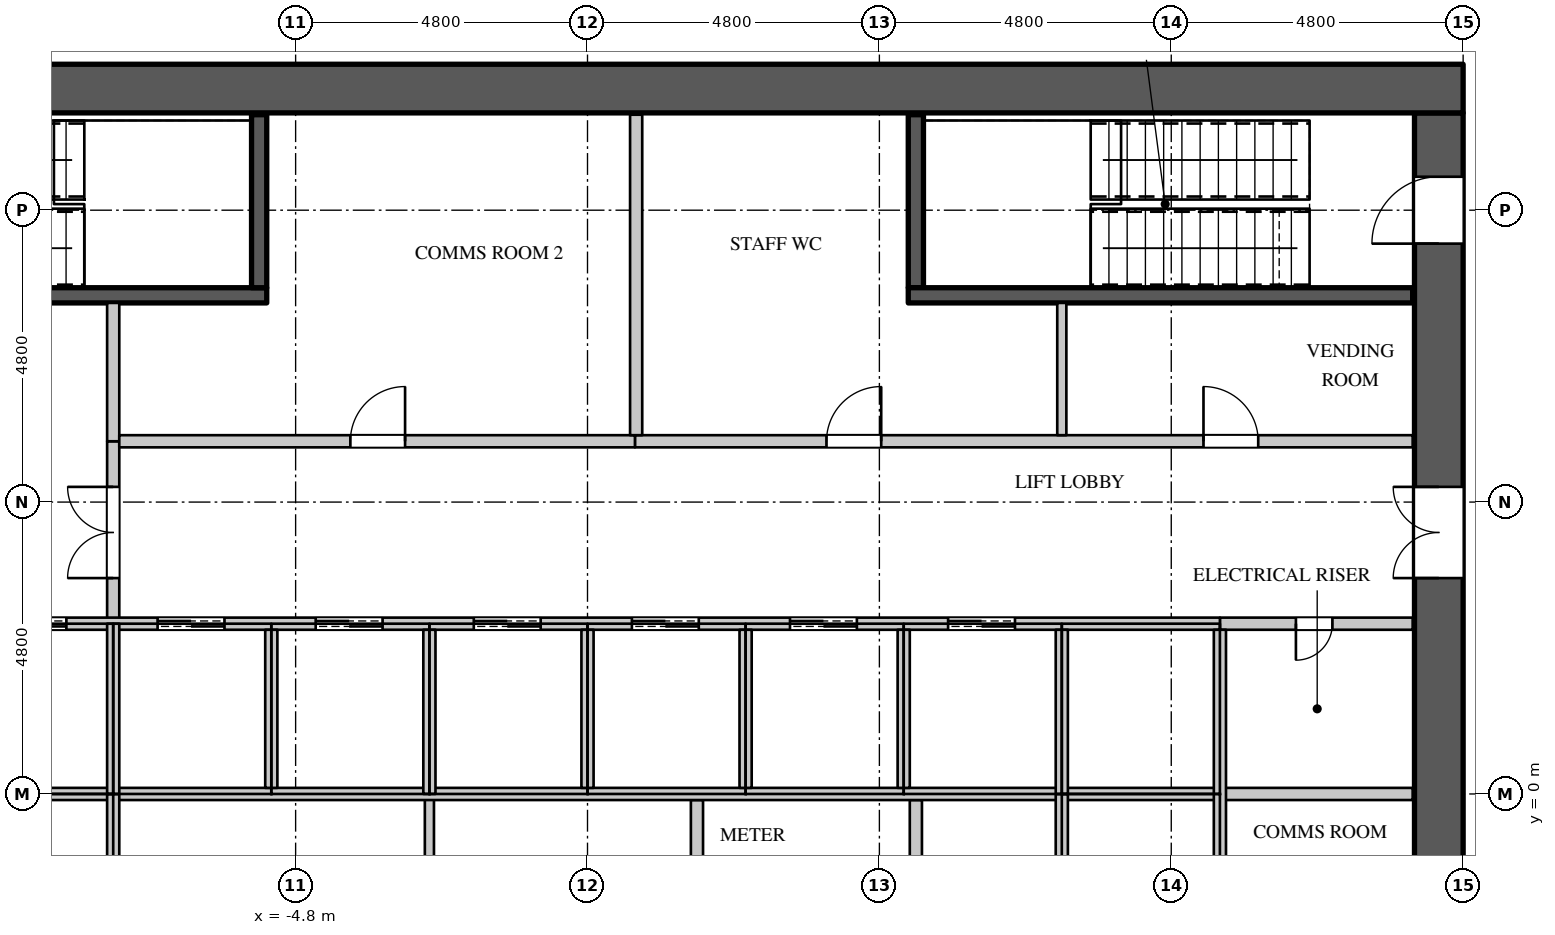
"""IFC4 building model, lengths in metres.
Left out: names, types, materials, properties, quantities, classifications, styles, units other than length and angle.
Written with IfcOpenShell. Run it as: python <this file> out.ifc"""

import sys

from ifc_helpers import new_model, si_unit, direction, frame, frame_2d, origin, place, context, subcontext, project, spatial, rectangle, extrude, element, fill, save


model = new_model("IFC4")
c1 = context("Model", 3, precision=1e-05, world=origin(), true_north=direction((0.0, 1.0)))
c2 = subcontext(c1, "Body", "Model", "MODEL_VIEW")
j1 = project(units=[si_unit("LENGTHUNIT", "METRE"), si_unit("PLANEANGLEUNIT", "RADIAN")], contexts=[c1])
p1 = place(None, origin())
s1 = spatial("IfcSite", under=j1, at=p1, CompositionType="ELEMENT")
p2 = place(p1, origin())
s2 = spatial("IfcBuilding", under=s1, at=p2, CompositionType="ELEMENT")
p3 = place(p2, frame((0.0, 0.0, 144.3)))
s3 = spatial("IfcBuildingStorey", under=s2, at=p3, CompositionType="ELEMENT", Elevation=144.3)
p4 = place(p3, frame((-14.4, 11.6, 0.0), z_axis=(0.0, 0.0, 1.0), x_axis=(1.0, 0.0, 0.0)))
e1 = element("IfcWall", 1, at=p4, inside=s3, PredefinedType="SHEAR", context=c2, shape_type="SweptSolid", body=[
    extrude(rectangle(XDim=28.8, YDim=0.8, at=frame_2d((14.4, 0.0))), origin(), (0.0, 0.0, 1.0), 4.2),
])
p5 = place(p3, frame((14.0, -11.2, 0.0), z_axis=(0.0, 0.0, 1.0), x_axis=(0.0, 1.0, 0.0)))
e2 = element("IfcWall", 2, at=p5, inside=s3, PredefinedType="SHEAR", context=c2, shape_type="SweptSolid", body=[
    extrude(rectangle(XDim=22.4, YDim=0.8, at=frame_2d((11.2, 0.0))), origin(), (0.0, 0.0, 1.0), 4.2),
])
p6 = place(p5, frame((20.25, 0.0, 0.0)))
e3 = element("IfcOpeningElement", 3, at=p6, cuts=e2, PredefinedType="OPENING", context=c2, shape_type="SweptSolid", body=[
    extrude(rectangle(XDim=1.1, YDim=2.2, at=frame_2d((0.55, 1.1))), frame((0.0, 0.41, 0.0), z_axis=(0.0, -1.0, 0.0), x_axis=(1.0, 0.0, 0.0)), (0.0, 0.0, 1.0), 0.82),
])
p7 = place(p5, frame((1.05, 0.0, 0.0)))
e4 = element("IfcOpeningElement", 4, at=p7, cuts=e2, PredefinedType="OPENING", context=c2, shape_type="SweptSolid", body=[
    extrude(rectangle(XDim=1.1, YDim=2.2, at=frame_2d((0.55, 1.1))), frame((0.0, 0.41, 0.0), z_axis=(0.0, -1.0, 0.0), x_axis=(1.0, 0.0, 0.0)), (0.0, 0.0, 1.0), 0.82),
])
p8 = place(p5, frame((14.75, 0.0, 0.0)))
e5 = element("IfcOpeningElement", 5, at=p8, cuts=e2, PredefinedType="OPENING", context=c2, shape_type="SweptSolid", body=[
    extrude(rectangle(XDim=1.5, YDim=2.4, at=frame_2d((0.75, 1.2))), frame((0.0, 0.41, 0.0), z_axis=(0.0, -1.0, 0.0), x_axis=(1.0, 0.0, 0.0)), (0.0, 0.0, 1.0), 0.82),
])
p9 = place(p5, frame((6.15, 0.0, 0.0)))
e6 = element("IfcOpeningElement", 6, at=p9, cuts=e2, PredefinedType="OPENING", context=c2, shape_type="SweptSolid", body=[
    extrude(rectangle(XDim=1.5, YDim=2.4, at=frame_2d((0.75, 1.2))), frame((0.0, 0.41, 0.0), z_axis=(0.0, -1.0, 0.0), x_axis=(1.0, 0.0, 0.0)), (0.0, 0.0, 1.0), 0.82),
])
p10 = place(p3, frame((-7.8, 2.8, 0.0), z_axis=(0.0, 0.0, 1.0), x_axis=(0.0, 1.0, 0.0)))
e7 = element("IfcWall", 7, at=p10, inside=s3, PredefinedType="PARTITIONING", context=c2, shape_type="SweptSolid", body=[
    extrude(rectangle(XDim=3.0, YDim=0.2, at=frame_2d((1.5, 0.0))), origin(), (0.0, 0.0, 1.0), 3.798),
])
p11 = place(p10, frame((0.75, 0.0, 0.0)))
e8 = element("IfcOpeningElement", 8, at=p11, cuts=e7, PredefinedType="OPENING", context=c2, shape_type="SweptSolid", body=[
    extrude(rectangle(XDim=1.5, YDim=2.4, at=frame_2d((0.75, 1.2))), frame((0.0, 0.11, 0.0), z_axis=(0.0, -1.0, 0.0), x_axis=(1.0, 0.0, 0.0)), (0.0, 0.0, 1.0), 0.22),
])
p12 = place(p3, frame((0.78, 5.8, 0.0), z_axis=(0.0, 0.0, 1.0), x_axis=(1.0, 0.0, 0.0)))
e9 = element("IfcWall", 9, at=p12, inside=s3, PredefinedType="PARTITIONING", context=c2, shape_type="SweptSolid", body=[
    extrude(rectangle(XDim=12.79, YDim=0.2, at=frame_2d((6.395, 0.0))), origin(), (0.0, 0.0, 1.0), 3.798),
])
p13 = place(p12, frame((3.15, 0.0, 0.0)))
e10 = element("IfcOpeningElement", 10, at=p13, cuts=e9, PredefinedType="OPENING", context=c2, shape_type="SweptSolid", body=[
    extrude(rectangle(XDim=0.9, YDim=2.2, at=frame_2d((0.45, 1.1))), frame((0.0, 0.11, 0.0), z_axis=(0.0, -1.0, 0.0), x_axis=(1.0, 0.0, 0.0)), (0.0, 0.0, 1.0), 0.22),
])
p14 = place(p12, frame((9.35, 0.0, 0.0)))
e11 = element("IfcOpeningElement", 11, at=p14, cuts=e9, PredefinedType="OPENING", context=c2, shape_type="SweptSolid", body=[
    extrude(rectangle(XDim=0.9, YDim=2.2, at=frame_2d((0.45, 1.1))), frame((0.0, 0.11, 0.0), z_axis=(0.0, -1.0, 0.0), x_axis=(1.0, 0.0, 0.0)), (0.0, 0.0, 1.0), 0.22),
])
p15 = place(p3, frame((-2.6, -2.7, 0.0), z_axis=(0.0, 0.0, 1.0), x_axis=(0.0, 1.0, 0.0)))
e12 = element("IfcWall", 12, at=p15, inside=s3, PredefinedType="PARTITIONING", context=c2, shape_type="SweptSolid", body=[
    extrude(rectangle(XDim=2.7, YDim=0.15, at=frame_2d((1.35, 0.0))), origin(), (0.0, 0.0, 1.0), 3.798),
])
p16 = place(p3, frame((7.8, 5.9, 0.0), z_axis=(0.0, 0.0, 1.0), x_axis=(0.0, 1.0, 0.0)))
e13 = element("IfcWall", 13, at=p16, inside=s3, PredefinedType="PARTITIONING", context=c2, shape_type="SweptSolid", body=[
    extrude(rectangle(XDim=2.175, YDim=0.15, at=frame_2d((1.087, 0.0))), origin(), (0.0, 0.0, 1.0), 3.798),
])
p17 = place(p3, frame((-7.8, 5.8, 0.0), z_axis=(0.0, 0.0, 1.0), x_axis=(0.0, 1.0, 0.0)))
e14 = element("IfcWall", 14, at=p17, inside=s3, PredefinedType="PARTITIONING", context=c2, shape_type="SweptSolid", body=[
    extrude(rectangle(XDim=2.275, YDim=0.2, at=frame_2d((1.137, 0.0))), origin(), (0.0, 0.0, 1.0), 3.798),
])
p18 = place(p3, frame((-7.7, 5.8, 0.0), z_axis=(0.0, 0.0, 1.0), x_axis=(1.0, 0.0, 0.0)))
e15 = element("IfcWall", 15, at=p18, inside=s3, PredefinedType="PARTITIONING", context=c2, shape_type="SweptSolid", body=[
    extrude(rectangle(XDim=8.48, YDim=0.2, at=frame_2d((4.24, 0.0))), origin(), (0.0, 0.0, 1.0), 3.798),
])
p19 = place(p18, frame((3.8, 0.0, 0.0)))
e16 = element("IfcOpeningElement", 16, at=p19, cuts=e15, PredefinedType="OPENING", context=c2, shape_type="SweptSolid", body=[
    extrude(rectangle(XDim=0.9, YDim=2.2, at=frame_2d((0.45, 1.1))), frame((0.0, 0.11, 0.0), z_axis=(0.0, -1.0, 0.0), x_axis=(1.0, 0.0, 0.0)), (0.0, 0.0, 1.0), 0.22),
])
p20 = place(p3, frame((0.8, 5.9, 0.0), z_axis=(0.0, 0.0, 1.0), x_axis=(0.0, 1.0, 0.0)))
e17 = element("IfcWall", 17, at=p20, inside=s3, PredefinedType="PARTITIONING", context=c2, shape_type="SweptSolid", body=[
    extrude(rectangle(XDim=5.27, YDim=0.2, at=frame_2d((2.635, 0.0))), origin(), (0.0, 0.0, 1.0), 3.798),
])
for number, where, z_axis, x_axis in (
    (18, (1.8, -2.7, 0.0), (0.0, 0.0, 1.0), (0.0, 1.0, 0.0)),
    (19, (5.4, -2.7, 0.0), (0.0, 0.0, 1.0), (0.0, 1.0, 0.0)),
):
    element("IfcWall", number, at=place(p3, frame(where, z_axis=z_axis, x_axis=x_axis)), inside=s3, PredefinedType="PARTITIONING", context=c2, shape_type="SweptSolid", body=[
        extrude(rectangle(XDim=2.6, YDim=0.2, at=frame_2d((1.3, 0.0))), origin(), (0.0, 0.0, 1.0), 3.798),
    ])
p21 = place(p3, frame((10.4, 2.8, 0.0), z_axis=(0.0, 0.0, 1.0), x_axis=(1.0, 0.0, 0.0)))
e20 = element("IfcWall", 20, at=p21, inside=s3, PredefinedType="PARTITIONING", context=c2, shape_type="SweptSolid", body=[
    extrude(rectangle(XDim=3.17, YDim=0.2, at=frame_2d((1.585, 0.0))), origin(), (0.0, 0.0, 1.0), 3.798),
])
p22 = place(p21, frame((1.25, 0.0, 0.0)))
e21 = element("IfcOpeningElement", 21, at=p22, cuts=e20, PredefinedType="OPENING", context=c2, shape_type="SweptSolid", body=[
    extrude(rectangle(XDim=0.6, YDim=2.0, at=frame_2d((0.3, 1.0))), frame((0.0, 0.11, 0.0), z_axis=(0.0, -1.0, 0.0), x_axis=(1.0, 0.0, 0.0)), (0.0, 0.0, 1.0), 0.22),
])
p23 = place(p3, frame((10.4, 0.0, 0.0), z_axis=(0.0, 0.0, 1.0), x_axis=(1.0, 0.0, 0.0)))
e22 = element("IfcWall", 22, at=p23, inside=s3, PredefinedType="PARTITIONING", context=c2, shape_type="SweptSolid", body=[
    extrude(rectangle(XDim=3.17, YDim=0.2, at=frame_2d((1.585, 0.0))), origin(), (0.0, 0.0, 1.0), 3.798),
])
p24 = place(p3, frame((-13.57, 0.0, 0.0), z_axis=(0.0, 0.0, 1.0), x_axis=(1.0, 0.0, 0.0)))
e23 = element("IfcWall", 23, at=p24, inside=s3, PredefinedType="PARTITIONING", context=c2, shape_type="SweptSolid", body=[
    extrude(rectangle(XDim=23.97, YDim=0.2, at=frame_2d((11.985, 0.0))), origin(), (0.0, 0.0, 1.0), 3.798),
])
p25 = place(p3, frame((-13.57, 2.8, 0.0), z_axis=(0.0, 0.0, 1.0), x_axis=(1.0, 0.0, 0.0)))
e24 = element("IfcWall", 24, at=p25, inside=s3, PredefinedType="PARTITIONING", context=c2, shape_type="SweptSolid", body=[
    extrude(rectangle(XDim=23.97, YDim=0.2, at=frame_2d((11.985, 0.0))), origin(), (0.0, 0.0, 1.0), 3.798),
])
p26 = place(p25, frame((1.0, 0.0, 0.0)))
e25 = element("IfcOpeningElement", 25, at=p26, cuts=e24, PredefinedType="OPENING", context=c2, shape_type="SweptSolid", body=[
    extrude(rectangle(XDim=1.1, YDim=2.2, at=frame_2d((0.55, 1.1))), frame((0.0, 0.11, 0.0), z_axis=(0.0, -1.0, 0.0), x_axis=(1.0, 0.0, 0.0)), (0.0, 0.0, 1.0), 0.22),
])
p27 = place(p25, frame((3.9, 0.0, 0.0)))
e26 = element("IfcOpeningElement", 26, at=p27, cuts=e24, PredefinedType="OPENING", context=c2, shape_type="SweptSolid", body=[
    extrude(rectangle(XDim=1.1, YDim=2.2, at=frame_2d((0.55, 1.1))), frame((0.0, 0.11, 0.0), z_axis=(0.0, -1.0, 0.0), x_axis=(1.0, 0.0, 0.0)), (0.0, 0.0, 1.0), 0.22),
])
p28 = place(p25, frame((6.5, 0.0, 0.0)))
e27 = element("IfcOpeningElement", 27, at=p28, cuts=e24, PredefinedType="OPENING", context=c2, shape_type="SweptSolid", body=[
    extrude(rectangle(XDim=1.1, YDim=2.2, at=frame_2d((0.55, 1.1))), frame((0.0, 0.11, 0.0), z_axis=(0.0, -1.0, 0.0), x_axis=(1.0, 0.0, 0.0)), (0.0, 0.0, 1.0), 0.22),
])
p29 = place(p25, frame((9.1, 0.0, 0.0)))
e28 = element("IfcOpeningElement", 28, at=p29, cuts=e24, PredefinedType="OPENING", context=c2, shape_type="SweptSolid", body=[
    extrude(rectangle(XDim=1.1, YDim=2.2, at=frame_2d((0.55, 1.1))), frame((0.0, 0.11, 0.0), z_axis=(0.0, -1.0, 0.0), x_axis=(1.0, 0.0, 0.0)), (0.0, 0.0, 1.0), 0.22),
])
p30 = place(p25, frame((11.7, 0.0, 0.0)))
e29 = element("IfcOpeningElement", 29, at=p30, cuts=e24, PredefinedType="OPENING", context=c2, shape_type="SweptSolid", body=[
    extrude(rectangle(XDim=1.1, YDim=2.2, at=frame_2d((0.55, 1.1))), frame((0.0, 0.11, 0.0), z_axis=(0.0, -1.0, 0.0), x_axis=(1.0, 0.0, 0.0)), (0.0, 0.0, 1.0), 0.22),
])
p31 = place(p25, frame((14.3, 0.0, 0.0)))
e30 = element("IfcOpeningElement", 30, at=p31, cuts=e24, PredefinedType="OPENING", context=c2, shape_type="SweptSolid", body=[
    extrude(rectangle(XDim=1.1, YDim=2.2, at=frame_2d((0.55, 1.1))), frame((0.0, 0.11, 0.0), z_axis=(0.0, -1.0, 0.0), x_axis=(1.0, 0.0, 0.0)), (0.0, 0.0, 1.0), 0.22),
])
p32 = place(p25, frame((16.9, 0.0, 0.0)))
e31 = element("IfcOpeningElement", 31, at=p32, cuts=e24, PredefinedType="OPENING", context=c2, shape_type="SweptSolid", body=[
    extrude(rectangle(XDim=1.1, YDim=2.2, at=frame_2d((0.55, 1.1))), frame((0.0, 0.11, 0.0), z_axis=(0.0, -1.0, 0.0), x_axis=(1.0, 0.0, 0.0)), (0.0, 0.0, 1.0), 0.22),
])
p33 = place(p25, frame((19.5, 0.0, 0.0)))
e32 = element("IfcOpeningElement", 32, at=p33, cuts=e24, PredefinedType="OPENING", context=c2, shape_type="SweptSolid", body=[
    extrude(rectangle(XDim=1.1, YDim=2.2, at=frame_2d((0.55, 1.1))), frame((0.0, 0.11, 0.0), z_axis=(0.0, -1.0, 0.0), x_axis=(1.0, 0.0, 0.0)), (0.0, 0.0, 1.0), 0.22),
])
for number, where, z_axis, x_axis in (
    (33, (-7.8, -2.8, 0.0), (0.0, 0.0, 1.0), (0.0, 1.0, 0.0)),
    (34, (-7.8, 0.0, 0.0), (0.0, 0.0, 1.0), (0.0, 1.0, 0.0)),
):
    element("IfcWall", number, at=place(p3, frame(where, z_axis=z_axis, x_axis=x_axis)), inside=s3, PredefinedType="PARTITIONING", context=c2, shape_type="SweptSolid", body=[
        extrude(rectangle(XDim=2.8, YDim=0.2, at=frame_2d((1.4, 0.0))), origin(), (0.0, 0.0, 1.0), 3.798),
    ])
p34 = place(p3, frame((-5.2, 0.1, 0.0), z_axis=(0.0, 0.0, 1.0), x_axis=(0.0, 1.0, 0.0)))
e35 = element("IfcWall", 35, at=p34, inside=s3, PredefinedType="PARTITIONING", context=c2, shape_type="SweptSolid", body=[
    extrude(rectangle(XDim=2.6, YDim=0.2, at=frame_2d((1.3, 0.0))), origin(), (0.0, 0.0, 1.0), 3.798),
])
p35 = place(p3, frame((-2.6, 0.0, 0.0), z_axis=(0.0, 0.0, 1.0), x_axis=(0.0, 1.0, 0.0)))
e36 = element("IfcWall", 36, at=p35, inside=s3, PredefinedType="PARTITIONING", context=c2, shape_type="SweptSolid", body=[
    extrude(rectangle(XDim=2.7, YDim=0.2, at=frame_2d((1.35, 0.0))), origin(), (0.0, 0.0, 1.0), 3.798),
])
for number, where, z_axis, x_axis in (
    (37, (0.0, 0.1, 0.0), (0.0, 0.0, 1.0), (0.0, 1.0, 0.0)),
    (38, (2.6, 0.1, 0.0), (0.0, 0.0, 1.0), (0.0, 1.0, 0.0)),
    (39, (5.2, 0.1, 0.0), (0.0, 0.0, 1.0), (0.0, 1.0, 0.0)),
):
    element("IfcWall", number, at=place(p3, frame(where, z_axis=z_axis, x_axis=x_axis)), inside=s3, PredefinedType="PARTITIONING", context=c2, shape_type="SweptSolid", body=[
        extrude(rectangle(XDim=2.6, YDim=0.2, at=frame_2d((1.3, 0.0))), origin(), (0.0, 0.0, 1.0), 3.798),
    ])
for number, where, z_axis, x_axis in (
    (40, (7.8, -2.7, 0.0), (0.0, 0.0, 1.0), (0.0, 1.0, 0.0)),
    (41, (7.8, 0.0, 0.0), (0.0, 0.0, 1.0), (0.0, 1.0, 0.0)),
):
    element("IfcWall", number, at=place(p3, frame(where, z_axis=z_axis, x_axis=x_axis)), inside=s3, PredefinedType="PARTITIONING", context=c2, shape_type="SweptSolid", body=[
        extrude(rectangle(XDim=2.7, YDim=0.2, at=frame_2d((1.35, 0.0))), origin(), (0.0, 0.0, 1.0), 3.798),
    ])
p36 = place(p3, frame((10.4, -2.7, 0.0), z_axis=(0.0, 0.0, 1.0), x_axis=(0.0, 1.0, 0.0)))
e42 = element("IfcWall", 42, at=p36, inside=s3, PredefinedType="PARTITIONING", context=c2, shape_type="SweptSolid", body=[
    extrude(rectangle(XDim=5.4, YDim=0.2, at=frame_2d((2.7, 0.0))), origin(), (0.0, 0.0, 1.0), 3.798),
])
p37 = place(p3, frame((-13.57, 8.2, 0.0), z_axis=(0.0, 0.0, 1.0), x_axis=(1.0, 0.0, 0.0)))
e43 = element("IfcWall", 43, at=p37, inside=s3, PredefinedType="SHEAR", context=c2, shape_type="SweptSolid", body=[
    extrude(rectangle(XDim=8.295, YDim=0.25, at=frame_2d((4.147, 0.0))), origin(), (0.0, 0.0, 1.0), 3.798),
])
p38 = place(p37, frame((0.15, 0.0, 0.0)))
e44 = element("IfcOpeningElement", 44, at=p38, cuts=e43, PredefinedType="OPENING", context=c2, shape_type="SweptSolid", body=[
    extrude(rectangle(XDim=1.1, YDim=2.2, at=frame_2d((0.55, 1.1))), frame((0.0, 0.135, 0.0), z_axis=(0.0, -1.0, 0.0), x_axis=(1.0, 0.0, 0.0)), (0.0, 0.0, 1.0), 0.27),
])
for number, where, z_axis, x_axis in (
    (45, (-5.4, 8.325, 0.0), (0.0, 0.0, 1.0), (0.0, 1.0, 0.0)),
    (46, (5.4, 8.325, 0.0), (0.0, 0.0, 1.0), (0.0, 1.0, 0.0)),
):
    element("IfcWall", number, at=place(p3, frame(where, z_axis=z_axis, x_axis=x_axis)), inside=s3, PredefinedType="SHEAR", context=c2, shape_type="SweptSolid", body=[
        extrude(rectangle(XDim=2.845, YDim=0.25, at=frame_2d((1.422, 0.0))), origin(), (0.0, 0.0, 1.0), 3.798),
    ])
p39 = place(p3, frame((5.275, 8.2, 0.0), z_axis=(0.0, 0.0, 1.0), x_axis=(1.0, 0.0, 0.0)))
e47 = element("IfcWall", 47, at=p39, inside=s3, PredefinedType="SHEAR", context=c2, shape_type="SweptSolid", body=[
    extrude(rectangle(XDim=8.295, YDim=0.25, at=frame_2d((4.147, 0.0))), origin(), (0.0, 0.0, 1.0), 3.798),
])
p40 = place(p22, origin())
e48 = element("IfcDoor", 48, at=p40, inside=s3, OperationType="SINGLE_SWING_RIGHT", PredefinedType="DOOR", context=c2, shape_type="SweptSolid", body=[
    extrude(rectangle(XDim=0.6, YDim=2.0, at=frame_2d((0.3, 1.0))), frame((0.0, 0.025, 0.0), z_axis=(0.0, -1.0, 0.0), x_axis=(1.0, 0.0, 0.0)), (0.0, 0.0, 1.0), 0.05),
])
fill(e21, e48)
p41 = place(p19, origin())
e49 = element("IfcDoor", 49, at=p41, inside=s3, OperationType="SINGLE_SWING_RIGHT", PredefinedType="DOOR", context=c2, shape_type="SweptSolid", body=[
    extrude(rectangle(XDim=0.9, YDim=2.2, at=frame_2d((0.45, 1.1))), frame((0.0, 0.025, 0.0), z_axis=(0.0, -1.0, 0.0), x_axis=(1.0, 0.0, 0.0)), (0.0, 0.0, 1.0), 0.05),
])
fill(e16, e49)
p42 = place(p13, origin())
e50 = element("IfcDoor", 50, at=p42, inside=s3, OperationType="SINGLE_SWING_RIGHT", PredefinedType="DOOR", context=c2, shape_type="SweptSolid", body=[
    extrude(rectangle(XDim=0.9, YDim=2.2, at=frame_2d((0.45, 1.1))), frame((0.0, 0.025, 0.0), z_axis=(0.0, -1.0, 0.0), x_axis=(1.0, 0.0, 0.0)), (0.0, 0.0, 1.0), 0.05),
])
fill(e10, e50)
p43 = place(p14, origin())
e51 = element("IfcDoor", 51, at=p43, inside=s3, OperationType="SINGLE_SWING_LEFT", PredefinedType="DOOR", context=c2, shape_type="SweptSolid", body=[
    extrude(rectangle(XDim=0.9, YDim=2.2, at=frame_2d((0.45, 1.1))), frame((0.0, 0.025, 0.0), z_axis=(0.0, -1.0, 0.0), x_axis=(1.0, 0.0, 0.0)), (0.0, 0.0, 1.0), 0.05),
])
fill(e11, e51)
p44 = place(p27, origin())
e52 = element("IfcDoor", 52, at=p44, inside=s3, OperationType="DOUBLE_DOOR_SLIDING", PredefinedType="DOOR", context=c2, shape_type="SweptSolid", body=[
    extrude(rectangle(XDim=1.1, YDim=2.2, at=frame_2d((0.55, 1.1))), frame((0.0, 0.025, 0.0), z_axis=(0.0, -1.0, 0.0), x_axis=(1.0, 0.0, 0.0)), (0.0, 0.0, 1.0), 0.05),
])
fill(e26, e52)
p45 = place(p28, origin())
e53 = element("IfcDoor", 53, at=p45, inside=s3, OperationType="DOUBLE_DOOR_SLIDING", PredefinedType="DOOR", context=c2, shape_type="SweptSolid", body=[
    extrude(rectangle(XDim=1.1, YDim=2.2, at=frame_2d((0.55, 1.1))), frame((0.0, 0.025, 0.0), z_axis=(0.0, -1.0, 0.0), x_axis=(1.0, 0.0, 0.0)), (0.0, 0.0, 1.0), 0.05),
])
fill(e27, e53)
p46 = place(p29, origin())
e54 = element("IfcDoor", 54, at=p46, inside=s3, OperationType="DOUBLE_DOOR_SLIDING", PredefinedType="DOOR", context=c2, shape_type="SweptSolid", body=[
    extrude(rectangle(XDim=1.1, YDim=2.2, at=frame_2d((0.55, 1.1))), frame((0.0, 0.025, 0.0), z_axis=(0.0, -1.0, 0.0), x_axis=(1.0, 0.0, 0.0)), (0.0, 0.0, 1.0), 0.05),
])
fill(e28, e54)
p47 = place(p30, origin())
e55 = element("IfcDoor", 55, at=p47, inside=s3, OperationType="DOUBLE_DOOR_SLIDING", PredefinedType="DOOR", context=c2, shape_type="SweptSolid", body=[
    extrude(rectangle(XDim=1.1, YDim=2.2, at=frame_2d((0.55, 1.1))), frame((0.0, 0.025, 0.0), z_axis=(0.0, -1.0, 0.0), x_axis=(1.0, 0.0, 0.0)), (0.0, 0.0, 1.0), 0.05),
])
fill(e29, e55)
p48 = place(p31, origin())
e56 = element("IfcDoor", 56, at=p48, inside=s3, OperationType="DOUBLE_DOOR_SLIDING", PredefinedType="DOOR", context=c2, shape_type="SweptSolid", body=[
    extrude(rectangle(XDim=1.1, YDim=2.2, at=frame_2d((0.55, 1.1))), frame((0.0, 0.025, 0.0), z_axis=(0.0, -1.0, 0.0), x_axis=(1.0, 0.0, 0.0)), (0.0, 0.0, 1.0), 0.05),
])
fill(e30, e56)
p49 = place(p32, origin())
e57 = element("IfcDoor", 57, at=p49, inside=s3, OperationType="DOUBLE_DOOR_SLIDING", PredefinedType="DOOR", context=c2, shape_type="SweptSolid", body=[
    extrude(rectangle(XDim=1.1, YDim=2.2, at=frame_2d((0.55, 1.1))), frame((0.0, 0.025, 0.0), z_axis=(0.0, -1.0, 0.0), x_axis=(1.0, 0.0, 0.0)), (0.0, 0.0, 1.0), 0.05),
])
fill(e31, e57)
p50 = place(p33, origin())
e58 = element("IfcDoor", 58, at=p50, inside=s3, OperationType="DOUBLE_DOOR_SLIDING", PredefinedType="DOOR", context=c2, shape_type="SweptSolid", body=[
    extrude(rectangle(XDim=1.1, YDim=2.2, at=frame_2d((0.55, 1.1))), frame((0.0, 0.025, 0.0), z_axis=(0.0, -1.0, 0.0), x_axis=(1.0, 0.0, 0.0)), (0.0, 0.0, 1.0), 0.05),
])
fill(e32, e58)
p51 = place(p11, origin())
e59 = element("IfcDoor", 59, at=p51, inside=s3, OperationType="DOUBLE_DOOR_SINGLE_SWING", PredefinedType="DOOR", context=c2, shape_type="SweptSolid", body=[
    extrude(rectangle(XDim=1.5, YDim=2.4, at=frame_2d((0.75, 1.2))), frame((0.0, 0.025, 0.0), z_axis=(0.0, -1.0, 0.0), x_axis=(1.0, 0.0, 0.0)), (0.0, 0.0, 1.0), 0.05),
])
fill(e8, e59)
p52 = place(p6, origin())
e60 = element("IfcDoor", 60, at=p52, inside=s3, OperationType="SINGLE_SWING_LEFT", PredefinedType="DOOR", context=c2, shape_type="SweptSolid", body=[
    extrude(rectangle(XDim=1.1, YDim=2.2, at=frame_2d((0.55, 1.1))), frame((0.0, 0.395, 0.0), z_axis=(0.0, -1.0, 0.0), x_axis=(1.0, 0.0, 0.0)), (0.0, 0.0, 1.0), 0.05),
])
fill(e3, e60)
p53 = place(p8, origin())
e61 = element("IfcDoor", 61, at=p53, inside=s3, OperationType="DOUBLE_DOOR_SINGLE_SWING", PredefinedType="DOOR", context=c2, shape_type="SweptSolid", body=[
    extrude(rectangle(XDim=1.5, YDim=2.4, at=frame_2d((0.75, 1.2))), frame((0.0, 0.395, 0.0), z_axis=(0.0, -1.0, 0.0), x_axis=(1.0, 0.0, 0.0)), (0.0, 0.0, 1.0), 0.05),
])
fill(e5, e61)
save(model, sys.argv[1])
